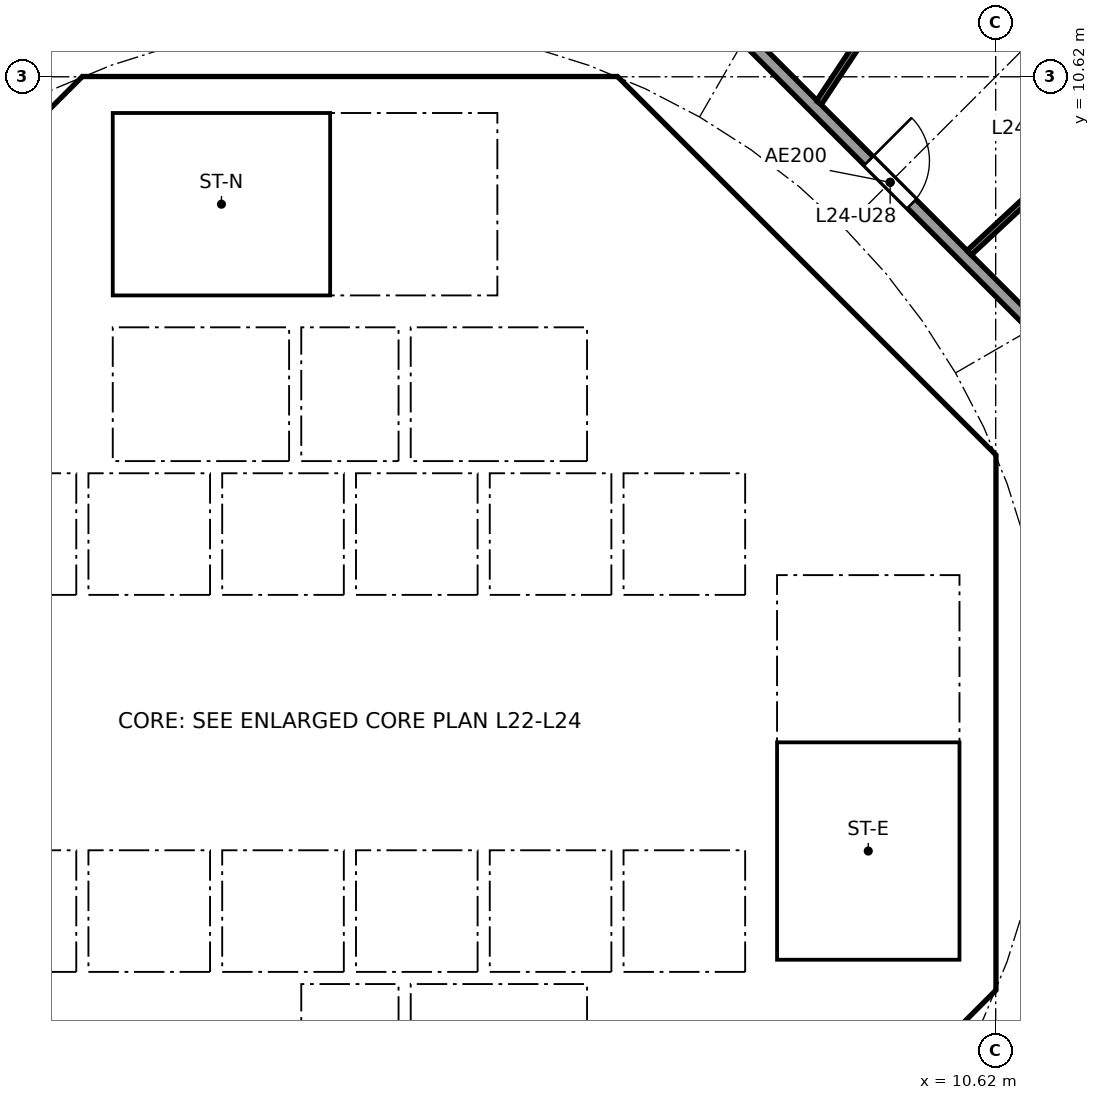
"""IFC4 building model, lengths in metres.
Left out: names, types, materials, properties, quantities, classifications, styles, units other than length and angle.
Written with IfcOpenShell. Run it as: python <this file> out.ifc"""

import sys

from ifc_helpers import new_model, si_unit, direction, frame, frame_2d, origin, place, context, subcontext, project, spatial, polyline, rectangle, outline, extrude, element, fill, save


model = new_model("IFC4")
c1 = context("Model", 3, precision=1e-05, world=origin(), true_north=direction((0.0, 1.0)))
c2 = subcontext(c1, "Body", "Model", "MODEL_VIEW")
j1 = project(units=[si_unit("LENGTHUNIT", "METRE"), si_unit("PLANEANGLEUNIT", "RADIAN")], contexts=[c1])
p1 = place(None, origin())
s1 = spatial("IfcSite", under=j1, at=p1, CompositionType="ELEMENT")
p2 = place(p1, origin())
s2 = spatial("IfcBuilding", under=s1, at=p2, CompositionType="ELEMENT")
p3 = place(p2, frame((0.0, 0.0, 99.2)))
s3 = spatial("IfcBuildingStorey", under=s2, at=p3, CompositionType="ELEMENT", Elevation=99.2)
p4 = place(p3, frame((9.988, 4.613, 0.0), z_axis=(0.0, 0.0, 1.0), x_axis=(-0.707106781187, 0.707106781187, 0.0)))
e1 = element("IfcWall", 1, at=p4, inside=s3, PredefinedType="SHEAR", context=c2, shape_type="SweptSolid", body=[
    extrude(rectangle(XDim=7.602, YDim=0.6, at=frame_2d((3.801, 0.0))), origin(), (0.0, 0.0, 1.0), 3.44),
])
p5 = place(p4, frame((3.201, 0.0, 0.0)))
e2 = element("IfcOpeningElement", 2, at=p5, cuts=e1, PredefinedType="OPENING", context=c2, shape_type="SweptSolid", body=[
    extrude(rectangle(XDim=1.2, YDim=2.1, at=frame_2d((0.6, 1.05))), frame((0.0, 0.31, 0.0), z_axis=(0.0, -1.0, 0.0), x_axis=(1.0, 0.0, 0.0)), (0.0, 0.0, 1.0), 0.62),
])
p6 = place(p3, frame((-4.613, 9.988, 0.0), z_axis=(0.0, 0.0, 1.0), x_axis=(-0.707106781187, -0.707106781187, 0.0)))
e3 = element("IfcWall", 3, at=p6, inside=s3, PredefinedType="SHEAR", context=c2, shape_type="SweptSolid", body=[
    extrude(rectangle(XDim=7.602, YDim=0.6, at=frame_2d((3.801, 0.0))), origin(), (0.0, 0.0, 1.0), 3.44),
])
p7 = place(p6, frame((0.351, 0.0, 0.0)))
e4 = element("IfcOpeningElement", 4, at=p7, cuts=e3, PredefinedType="OPENING", context=c2, shape_type="SweptSolid", body=[
    extrude(rectangle(XDim=1.1, YDim=2.1, at=frame_2d((0.55, 1.05))), frame((0.0, 0.31, 0.0), z_axis=(0.0, -1.0, 0.0), x_axis=(1.0, 0.0, 0.0)), (0.0, 0.0, 1.0), 0.62),
])
p8 = place(p3, frame((-9.988, -4.613, 0.0), z_axis=(0.0, 0.0, 1.0), x_axis=(0.707106781187, -0.707106781187, 0.0)))
e5 = element("IfcWall", 5, at=p8, inside=s3, PredefinedType="SHEAR", context=c2, shape_type="SweptSolid", body=[
    extrude(rectangle(XDim=7.602, YDim=0.6, at=frame_2d((3.801, 0.0))), origin(), (0.0, 0.0, 1.0), 3.44),
])
p9 = place(p8, frame((6.151, 0.0, 0.0)))
e6 = element("IfcOpeningElement", 6, at=p9, cuts=e5, PredefinedType="OPENING", context=c2, shape_type="SweptSolid", body=[
    extrude(rectangle(XDim=1.1, YDim=2.1, at=frame_2d((0.55, 1.05))), frame((0.0, 0.31, 0.0), z_axis=(0.0, -1.0, 0.0), x_axis=(1.0, 0.0, 0.0)), (0.0, 0.0, 1.0), 0.62),
])
p10 = place(p3, frame((4.613, -9.988, 0.0), z_axis=(0.0, 0.0, 1.0), x_axis=(0.707106781187, 0.707106781187, 0.0)))
e7 = element("IfcWall", 7, at=p10, inside=s3, PredefinedType="SHEAR", context=c2, shape_type="SweptSolid", body=[
    extrude(rectangle(XDim=7.602, YDim=0.6, at=frame_2d((3.801, 0.0))), origin(), (0.0, 0.0, 1.0), 3.44),
])
p11 = place(p10, frame((3.201, 0.0, 0.0)))
e8 = element("IfcOpeningElement", 8, at=p11, cuts=e7, PredefinedType="OPENING", context=c2, shape_type="SweptSolid", body=[
    extrude(rectangle(XDim=1.2, YDim=2.1, at=frame_2d((0.6, 1.05))), frame((0.0, 0.31, 0.0), z_axis=(0.0, -1.0, 0.0), x_axis=(1.0, 0.0, 0.0)), (0.0, 0.0, 1.0), 0.62),
])
p12 = place(p3, frame((4.0, 4.3, 0.0), z_axis=(0.0, 0.0, 1.0), x_axis=(0.0, 1.0, 0.0)))
e9 = element("IfcWall", 9, at=p12, inside=s3, PredefinedType="SOLIDWALL", context=c2, shape_type="SweptSolid", body=[
    extrude(rectangle(XDim=2.2, YDim=0.2, at=frame_2d((1.1, 0.0))), origin(), (0.0, 0.0, 1.0), 3.44),
])
p13 = place(p12, frame((0.55, 0.0, 0.0)))
e10 = element("IfcOpeningElement", 10, at=p13, cuts=e9, PredefinedType="OPENING", context=c2, shape_type="SweptSolid", body=[
    extrude(rectangle(XDim=1.1, YDim=2.1, at=frame_2d((0.55, 1.05))), frame((0.0, 0.11, 0.0), z_axis=(0.0, -1.0, 0.0), x_axis=(1.0, 0.0, 0.0)), (0.0, 0.0, 1.0), 0.22),
])
p14 = place(p3, frame((-4.0, 4.3, 0.0), z_axis=(0.0, 0.0, 1.0), x_axis=(0.0, 1.0, 0.0)))
e11 = element("IfcWall", 11, at=p14, inside=s3, PredefinedType="SOLIDWALL", context=c2, shape_type="SweptSolid", body=[
    extrude(rectangle(XDim=2.2, YDim=0.2, at=frame_2d((1.1, 0.0))), origin(), (0.0, 0.0, 1.0), 3.44),
])
p15 = place(p14, frame((0.55, 0.0, 0.0)))
e12 = element("IfcOpeningElement", 12, at=p15, cuts=e11, PredefinedType="OPENING", context=c2, shape_type="SweptSolid", body=[
    extrude(rectangle(XDim=1.1, YDim=2.1, at=frame_2d((0.55, 1.05))), frame((0.0, 0.11, 0.0), z_axis=(0.0, -1.0, 0.0), x_axis=(1.0, 0.0, 0.0)), (0.0, 0.0, 1.0), 0.22),
])
p16 = place(p3, frame((-6.7, 2.0, 0.0), z_axis=(0.0, 0.0, 1.0), x_axis=(1.0, 0.0, 0.0)))
e13 = element("IfcWall", 13, at=p16, inside=s3, PredefinedType="SOLIDWALL", context=c2, shape_type="SweptSolid", body=[
    extrude(rectangle(XDim=13.4, YDim=0.2, at=frame_2d((6.7, 0.0))), origin(), (0.0, 0.0, 1.0), 3.44),
])
p17 = place(p16, frame((0.65, 0.0, 0.0)))
e14 = element("IfcOpeningElement", 14, at=p17, cuts=e13, PredefinedType="OPENING", context=c2, shape_type="SweptSolid", body=[
    extrude(rectangle(XDim=1.1, YDim=2.1, at=frame_2d((0.55, 1.05))), frame((0.0, 0.11, 0.0), z_axis=(0.0, -1.0, 0.0), x_axis=(1.0, 0.0, 0.0)), (0.0, 0.0, 1.0), 0.22),
])
p18 = place(p16, frame((2.85, 0.0, 0.0)))
e15 = element("IfcOpeningElement", 15, at=p18, cuts=e13, PredefinedType="OPENING", context=c2, shape_type="SweptSolid", body=[
    extrude(rectangle(XDim=1.1, YDim=2.1, at=frame_2d((0.55, 1.05))), frame((0.0, 0.11, 0.0), z_axis=(0.0, -1.0, 0.0), x_axis=(1.0, 0.0, 0.0)), (0.0, 0.0, 1.0), 0.22),
])
p19 = place(p16, frame((5.05, 0.0, 0.0)))
e16 = element("IfcOpeningElement", 16, at=p19, cuts=e13, PredefinedType="OPENING", context=c2, shape_type="SweptSolid", body=[
    extrude(rectangle(XDim=1.1, YDim=2.1, at=frame_2d((0.55, 1.05))), frame((0.0, 0.11, 0.0), z_axis=(0.0, -1.0, 0.0), x_axis=(1.0, 0.0, 0.0)), (0.0, 0.0, 1.0), 0.22),
])
p20 = place(p3, frame((6.7, 4.0, 0.0), z_axis=(0.0, 0.0, 1.0), x_axis=(1.0, 0.0, 0.0)))
e17 = element("IfcWall", 17, at=p20, inside=s3, PredefinedType="SOLIDWALL", context=c2, shape_type="SweptSolid", body=[
    extrude(rectangle(XDim=3.325, YDim=0.2, at=frame_2d((1.662, 0.0))), origin(), (0.0, 0.0, 1.0), 3.44),
])
p21 = place(p20, frame((1.25, 0.0, 0.0)))
e18 = element("IfcOpeningElement", 18, at=p21, cuts=e17, PredefinedType="OPENING", context=c2, shape_type="SweptSolid", body=[
    extrude(rectangle(XDim=1.1, YDim=2.1, at=frame_2d((0.55, 1.05))), frame((0.0, 0.11, 0.0), z_axis=(0.0, -1.0, 0.0), x_axis=(1.0, 0.0, 0.0)), (0.0, 0.0, 1.0), 0.22),
])
p22 = place(p3, frame((4.0, 7.025, 0.0), z_axis=(0.0, 0.0, 1.0), x_axis=(0.0, 1.0, 0.0)))
e19 = element("IfcWall", 19, at=p22, inside=s3, PredefinedType="SOLIDWALL", context=c2, shape_type="SweptSolid", body=[
    extrude(rectangle(XDim=3.0, YDim=0.2, at=frame_2d((1.5, 0.0))), origin(), (0.0, 0.0, 1.0), 3.44),
])
p23 = place(p22, frame((0.925, 0.0, 0.0)))
e20 = element("IfcOpeningElement", 20, at=p23, cuts=e19, PredefinedType="OPENING", context=c2, shape_type="SweptSolid", body=[
    extrude(rectangle(XDim=1.1, YDim=2.1, at=frame_2d((0.55, 1.05))), frame((0.0, 0.11, 0.0), z_axis=(0.0, -1.0, 0.0), x_axis=(1.0, 0.0, 0.0)), (0.0, 0.0, 1.0), 0.22),
])
p24 = place(p3, frame((4.0, -6.5, 0.0), z_axis=(0.0, 0.0, 1.0), x_axis=(0.0, 1.0, 0.0)))
e21 = element("IfcWall", 21, at=p24, inside=s3, PredefinedType="SOLIDWALL", context=c2, shape_type="SweptSolid", body=[
    extrude(rectangle(XDim=2.2, YDim=0.2, at=frame_2d((1.1, 0.0))), origin(), (0.0, 0.0, 1.0), 3.44),
])
p25 = place(p24, frame((0.55, 0.0, 0.0)))
e22 = element("IfcOpeningElement", 22, at=p25, cuts=e21, PredefinedType="OPENING", context=c2, shape_type="SweptSolid", body=[
    extrude(rectangle(XDim=1.1, YDim=2.1, at=frame_2d((0.55, 1.05))), frame((0.0, 0.11, 0.0), z_axis=(0.0, -1.0, 0.0), x_axis=(1.0, 0.0, 0.0)), (0.0, 0.0, 1.0), 0.22),
])
p26 = place(p3, frame((-4.0, -6.5, 0.0), z_axis=(0.0, 0.0, 1.0), x_axis=(0.0, 1.0, 0.0)))
e23 = element("IfcWall", 23, at=p26, inside=s3, PredefinedType="SOLIDWALL", context=c2, shape_type="SweptSolid", body=[
    extrude(rectangle(XDim=2.2, YDim=0.2, at=frame_2d((1.1, 0.0))), origin(), (0.0, 0.0, 1.0), 3.44),
])
p27 = place(p26, frame((0.65, 0.0, 0.0)))
e24 = element("IfcOpeningElement", 24, at=p27, cuts=e23, PredefinedType="OPENING", context=c2, shape_type="SweptSolid", body=[
    extrude(rectangle(XDim=0.9, YDim=2.1, at=frame_2d((0.45, 1.05))), frame((0.0, 0.11, 0.0), z_axis=(0.0, -1.0, 0.0), x_axis=(1.0, 0.0, 0.0)), (0.0, 0.0, 1.0), 0.22),
])
p28 = place(p3, frame((-6.7, -2.0, 0.0), z_axis=(0.0, 0.0, 1.0), x_axis=(1.0, 0.0, 0.0)))
e25 = element("IfcWall", 25, at=p28, inside=s3, PredefinedType="SOLIDWALL", context=c2, shape_type="SweptSolid", body=[
    extrude(rectangle(XDim=13.4, YDim=0.2, at=frame_2d((6.7, 0.0))), origin(), (0.0, 0.0, 1.0), 3.44),
])
p29 = place(p28, frame((0.65, 0.0, 0.0)))
e26 = element("IfcOpeningElement", 26, at=p29, cuts=e25, PredefinedType="OPENING", context=c2, shape_type="SweptSolid", body=[
    extrude(rectangle(XDim=1.1, YDim=2.1, at=frame_2d((0.55, 1.05))), frame((0.0, 0.11, 0.0), z_axis=(0.0, -1.0, 0.0), x_axis=(1.0, 0.0, 0.0)), (0.0, 0.0, 1.0), 0.22),
])
p30 = place(p28, frame((2.85, 0.0, 0.0)))
e27 = element("IfcOpeningElement", 27, at=p30, cuts=e25, PredefinedType="OPENING", context=c2, shape_type="SweptSolid", body=[
    extrude(rectangle(XDim=1.1, YDim=2.1, at=frame_2d((0.55, 1.05))), frame((0.0, 0.11, 0.0), z_axis=(0.0, -1.0, 0.0), x_axis=(1.0, 0.0, 0.0)), (0.0, 0.0, 1.0), 0.22),
])
p31 = place(p3, origin())
e28 = element("IfcWall", 28, at=p31, inside=s3, PredefinedType="SHEAR", context=c2, shape_type="SweptSolid", body=[
    extrude(outline(polyline([(-4.152, 10.025), (-4.401, 9.776), (-4.825, 10.2), (-4.401, 10.625), (4.401, 10.625), (4.825, 10.2), (4.401, 9.776), (4.152, 10.025), (-4.152, 10.025)])), origin(), (0.0, 0.0, 1.0), 3.44),
])
p32 = place(p3, origin())
e29 = element("IfcWall", 29, at=p32, inside=s3, PredefinedType="SHEAR", context=c2, shape_type="SweptSolid", body=[
    extrude(outline(polyline([(9.776, -4.401), (10.025, -4.152), (10.025, -3.801), (10.025, 4.152), (9.776, 4.401), (10.2, 4.825), (10.625, 4.401), (10.625, -4.401), (10.2, -4.825), (9.776, -4.401)])), origin(), (0.0, 0.0, 1.0), 3.44),
])
for number, where, z_axis, x_axis in (
    (30, (-0.9, -6.5, 0.0), (0.0, 0.0, 1.0), (0.0, 1.0, 0.0)),
    (31, (0.9, -6.5, 0.0), (0.0, 0.0, 1.0), (0.0, 1.0, 0.0)),
):
    element("IfcWall", number, at=place(p3, frame(where, z_axis=z_axis, x_axis=x_axis)), inside=s3, PredefinedType="SOLIDWALL", context=c2, shape_type="SweptSolid", body=[
        extrude(rectangle(XDim=2.2, YDim=0.2, at=frame_2d((1.1, 0.0))), origin(), (0.0, 0.0, 1.0), 3.44),
    ])
p33 = place(p3, origin())
e32 = element("IfcWall", 32, at=p33, inside=s3, PredefinedType="SOLIDWALL", context=c2, shape_type="SweptSolid", body=[
    extrude(outline(polyline([(-6.7, -2.1), (-6.5, -2.1), (-6.5, -4.1), (-4.5, -4.1), (-4.5, -2.1), (-4.3, -2.1), (-4.3, -4.1), (-2.3, -4.1), (-2.3, -2.1), (-2.1, -2.1), (-2.1, -4.1), (-0.1, -4.1), (-0.1, -2.1), (0.1, -2.1), (0.1, -4.1), (2.1, -4.1), (2.1, -2.1), (2.3, -2.1), (2.3, -4.1), (4.3, -4.1), (4.3, -2.1), (4.5, -2.1), (4.5, -4.1), (6.5, -4.1), (6.5, -2.1), (6.7, -2.1), (6.7, -4.3), (-6.7, -4.3), (-6.7, -2.1)])), origin(), (0.0, 0.0, 1.0), 3.44),
])
for number, where, z_axis, x_axis in (
    (33, (-0.9, 4.3, 0.0), (0.0, 0.0, 1.0), (0.0, 1.0, 0.0)),
    (34, (0.9, 4.3, 0.0), (0.0, 0.0, 1.0), (0.0, 1.0, 0.0)),
):
    element("IfcWall", number, at=place(p3, frame(where, z_axis=z_axis, x_axis=x_axis)), inside=s3, PredefinedType="SOLIDWALL", context=c2, shape_type="SweptSolid", body=[
        extrude(rectangle(XDim=2.2, YDim=0.2, at=frame_2d((1.1, 0.0))), origin(), (0.0, 0.0, 1.0), 3.44),
    ])
p34 = place(p3, origin())
e35 = element("IfcWall", 35, at=p34, inside=s3, PredefinedType="SOLIDWALL", context=c2, shape_type="SweptSolid", body=[
    extrude(outline(polyline([(-6.5, 2.1), (-6.7, 2.1), (-6.7, 4.3), (6.7, 4.3), (6.7, 2.1), (6.5, 2.1), (6.5, 4.1), (4.5, 4.1), (4.5, 2.1), (4.3, 2.1), (4.3, 4.1), (2.3, 4.1), (2.3, 2.1), (2.1, 2.1), (2.1, 4.1), (0.1, 4.1), (0.1, 2.1), (-0.1, 2.1), (-0.1, 4.1), (-2.1, 4.1), (-2.1, 2.1), (-2.3, 2.1), (-2.3, 4.1), (-4.3, 4.1), (-4.3, 2.1), (-4.5, 2.1), (-4.5, 4.1), (-6.5, 4.1), (-6.5, 2.1)])), origin(), (0.0, 0.0, 1.0), 3.44),
])
p35 = place(p3, origin())
e36 = element("IfcWall", 36, at=p35, inside=s3, PredefinedType="SOLIDWALL", context=c2, shape_type="SweptSolid", body=[
    extrude(outline(polyline([(-3.9, 7.025), (-4.1, 7.025), (-4.1, 10.025), (-3.9, 10.025), (-3.9, 7.025)])), origin(), (0.0, 0.0, 1.0), 3.44),
])
p36 = place(p3, origin())
e37 = element("IfcWall", 37, at=p36, inside=s3, PredefinedType="SOLIDWALL", context=c2, shape_type="SweptSolid", body=[
    extrude(outline(polyline([(4.1, 6.5), (-4.1, 6.5), (-4.1, 7.025), (4.1, 7.025), (4.1, 6.5)])), origin(), (0.0, 0.0, 1.0), 3.44),
])
p37 = place(p3, origin())
e38 = element("IfcWall", 38, at=p37, inside=s3, PredefinedType="SOLIDWALL", context=c2, shape_type="SweptSolid", body=[
    extrude(outline(polyline([(7.025, -3.9), (6.7, -3.9), (6.7, 3.9), (7.025, 3.9), (7.025, -3.9)])), origin(), (0.0, 0.0, 1.0), 3.44),
])
p38 = place(p3, origin())
e39 = element("IfcWall", 39, at=p38, inside=s3, PredefinedType="SOLIDWALL", context=c2, shape_type="SweptSolid", body=[
    extrude(outline(polyline([(10.025, -4.1), (6.7, -4.1), (6.7, -3.9), (10.025, -3.9), (10.025, -4.1)])), origin(), (0.0, 0.0, 1.0), 3.44),
])
p39 = place(p3, frame((12.635, 5.134, 0.0), z_axis=(0.0, 0.0, 1.0), x_axis=(-0.707106781187, 0.707106781187, 0.0)))
e40 = element("IfcWall", 40, at=p39, inside=s3, PredefinedType="PARTITIONING", context=c2, shape_type="SweptSolid", body=[
    extrude(rectangle(XDim=10.609, YDim=0.2, at=frame_2d((5.305, 0.0))), origin(), (0.0, 0.0, 1.0), 3.44),
])
p40 = place(p39, frame((4.804, 0.0, 0.0)))
e41 = element("IfcOpeningElement", 41, at=p40, cuts=e40, PredefinedType="OPENING", context=c2, shape_type="SweptSolid", body=[
    extrude(rectangle(XDim=1.0, YDim=2.1, at=frame_2d((0.5, 1.05))), frame((0.0, 0.11, 0.0), z_axis=(0.0, -1.0, 0.0), x_axis=(1.0, 0.0, 0.0)), (0.0, 0.0, 1.0), 0.22),
])
p41 = place(p3, frame((10.185, 7.726, 0.0), z_axis=(0.0, 0.0, 1.0), x_axis=(0.732598472978, 0.680661059112, 0.0)))
e42 = element("IfcWall", 42, at=p41, inside=s3, PredefinedType="PARTITIONING", context=c2, shape_type="SweptSolid", body=[
    extrude(rectangle(XDim=10.167, YDim=0.1, at=frame_2d((5.084, 0.0))), origin(), (0.0, 0.0, 1.0), 2.687),
])
p42 = place(p41, frame((1.725, 0.0, 0.0)))
e43 = element("IfcOpeningElement", 43, at=p42, cuts=e42, PredefinedType="OPENING", context=c2, shape_type="SweptSolid", body=[
    extrude(rectangle(XDim=0.9, YDim=2.1, at=frame_2d((0.45, 1.05))), frame((0.0, 0.06, 0.0), z_axis=(0.0, -1.0, 0.0), x_axis=(1.0, 0.0, 0.0)), (0.0, 0.0, 1.0), 0.12),
])
p43 = place(p41, frame((6.784, 0.0, 0.0)))
e44 = element("IfcOpeningElement", 44, at=p43, cuts=e42, PredefinedType="OPENING", context=c2, shape_type="SweptSolid", body=[
    extrude(rectangle(XDim=0.9, YDim=2.1, at=frame_2d((0.45, 1.05))), frame((0.0, 0.06, 0.0), z_axis=(0.0, -1.0, 0.0), x_axis=(1.0, 0.0, 0.0)), (0.0, 0.0, 1.0), 0.12),
])
p44 = place(p3, frame((7.713, 10.195, 0.0), z_axis=(0.0, 0.0, 1.0), x_axis=(0.552111071171, 0.833770571015, 0.0)))
e45 = element("IfcWall", 45, at=p44, inside=s3, PredefinedType="PARTITIONING", context=c2, shape_type="SweptSolid", body=[
    extrude(rectangle(XDim=17.208, YDim=0.1, at=frame_2d((8.604, 0.0))), origin(), (0.0, 0.0, 1.0), 2.687),
])
p45 = place(p44, frame((1.976, 0.0, 0.0)))
e46 = element("IfcOpeningElement", 46, at=p45, cuts=e45, PredefinedType="OPENING", context=c2, shape_type="SweptSolid", body=[
    extrude(rectangle(XDim=0.9, YDim=2.1, at=frame_2d((0.45, 1.05))), frame((0.0, 0.06, 0.0), z_axis=(0.0, -1.0, 0.0), x_axis=(1.0, 0.0, 0.0)), (0.0, 0.0, 1.0), 0.12),
])
p46 = place(p44, frame((7.611, 0.0, 0.0)))
e47 = element("IfcOpeningElement", 47, at=p46, cuts=e45, PredefinedType="OPENING", context=c2, shape_type="SweptSolid", body=[
    extrude(rectangle(XDim=0.9, YDim=2.1, at=frame_2d((0.45, 1.05))), frame((0.0, 0.06, 0.0), z_axis=(0.0, -1.0, 0.0), x_axis=(1.0, 0.0, 0.0)), (0.0, 0.0, 1.0), 0.12),
])
p47 = place(p44, frame((13.79, 0.0, 0.0)))
e48 = element("IfcOpeningElement", 48, at=p47, cuts=e45, PredefinedType="OPENING", context=c2, shape_type="SweptSolid", body=[
    extrude(rectangle(XDim=0.9, YDim=2.1, at=frame_2d((0.45, 1.05))), frame((0.0, 0.06, 0.0), z_axis=(0.0, -1.0, 0.0), x_axis=(1.0, 0.0, 0.0)), (0.0, 0.0, 1.0), 0.12),
])
p48 = place(p18, origin())
e49 = element("IfcDoor", 49, at=p48, inside=s3, OperationType="DOUBLE_DOOR_SLIDING", PredefinedType="DOOR", context=c2, shape_type="SweptSolid", body=[
    extrude(rectangle(XDim=1.1, YDim=2.1, at=frame_2d((0.55, 1.05))), frame((0.0, 0.025, 0.0), z_axis=(0.0, -1.0, 0.0), x_axis=(1.0, 0.0, 0.0)), (0.0, 0.0, 1.0), 0.05),
])
fill(e15, e49)
p49 = place(p19, origin())
e50 = element("IfcDoor", 50, at=p49, inside=s3, OperationType="DOUBLE_DOOR_SLIDING", PredefinedType="DOOR", context=c2, shape_type="SweptSolid", body=[
    extrude(rectangle(XDim=1.1, YDim=2.1, at=frame_2d((0.55, 1.05))), frame((0.0, 0.025, 0.0), z_axis=(0.0, -1.0, 0.0), x_axis=(1.0, 0.0, 0.0)), (0.0, 0.0, 1.0), 0.05),
])
fill(e16, e50)
p50 = place(p30, origin())
e51 = element("IfcDoor", 51, at=p50, inside=s3, OperationType="DOUBLE_DOOR_SLIDING", PredefinedType="DOOR", context=c2, shape_type="SweptSolid", body=[
    extrude(rectangle(XDim=1.1, YDim=2.1, at=frame_2d((0.55, 1.05))), frame((0.0, 0.025, 0.0), z_axis=(0.0, -1.0, 0.0), x_axis=(1.0, 0.0, 0.0)), (0.0, 0.0, 1.0), 0.05),
])
fill(e27, e51)
p51 = place(p13, origin())
e52 = element("IfcDoor", 52, at=p51, inside=s3, OperationType="DOUBLE_DOOR_SLIDING", PredefinedType="DOOR", context=c2, shape_type="SweptSolid", body=[
    extrude(rectangle(XDim=1.1, YDim=2.1, at=frame_2d((0.55, 1.05))), frame((0.0, 0.025, 0.0), z_axis=(0.0, -1.0, 0.0), x_axis=(1.0, 0.0, 0.0)), (0.0, 0.0, 1.0), 0.05),
])
fill(e10, e52)
p52 = place(p25, origin())
e53 = element("IfcDoor", 53, at=p52, inside=s3, OperationType="DOUBLE_DOOR_SLIDING", PredefinedType="DOOR", context=c2, shape_type="SweptSolid", body=[
    extrude(rectangle(XDim=1.1, YDim=2.1, at=frame_2d((0.55, 1.05))), frame((0.0, 0.025, 0.0), z_axis=(0.0, -1.0, 0.0), x_axis=(1.0, 0.0, 0.0)), (0.0, 0.0, 1.0), 0.05),
])
fill(e22, e53)
p53 = place(p15, origin())
e54 = element("IfcDoor", 54, at=p53, inside=s3, OperationType="DOUBLE_DOOR_SLIDING", PredefinedType="DOOR", context=c2, shape_type="SweptSolid", body=[
    extrude(rectangle(XDim=1.1, YDim=2.1, at=frame_2d((0.55, 1.05))), frame((0.0, 0.025, 0.0), z_axis=(0.0, -1.0, 0.0), x_axis=(1.0, 0.0, 0.0)), (0.0, 0.0, 1.0), 0.05),
])
fill(e12, e54)
p54 = place(p21, frame((1.1, 0.0, 0.0), x_axis=(-1.0, 0.0, 0.0)))
e55 = element("IfcDoor", 55, at=p54, inside=s3, OperationType="SINGLE_SWING_LEFT", PredefinedType="DOOR", context=c2, shape_type="SweptSolid", body=[
    extrude(rectangle(XDim=1.1, YDim=2.1, at=frame_2d((0.55, 1.05))), frame((0.0, 0.025, 0.0), z_axis=(0.0, -1.0, 0.0), x_axis=(1.0, 0.0, 0.0)), (0.0, 0.0, 1.0), 0.05),
])
fill(e18, e55)
p55 = place(p23, origin())
e56 = element("IfcDoor", 56, at=p55, inside=s3, OperationType="SINGLE_SWING_RIGHT", PredefinedType="DOOR", context=c2, shape_type="SweptSolid", body=[
    extrude(rectangle(XDim=1.1, YDim=2.1, at=frame_2d((0.55, 1.05))), frame((0.0, 0.025, 0.0), z_axis=(0.0, -1.0, 0.0), x_axis=(1.0, 0.0, 0.0)), (0.0, 0.0, 1.0), 0.05),
])
fill(e20, e56)
p56 = place(p5, origin())
e57 = element("IfcDoor", 57, at=p56, inside=s3, OperationType="SINGLE_SWING_LEFT", PredefinedType="DOOR", context=c2, shape_type="SweptSolid", body=[
    extrude(rectangle(XDim=1.2, YDim=2.1, at=frame_2d((0.6, 1.05))), frame((0.0, 0.025, 0.0), z_axis=(0.0, -1.0, 0.0), x_axis=(1.0, 0.0, 0.0)), (0.0, 0.0, 1.0), 0.05),
])
fill(e2, e57)
p57 = place(p7, origin())
e58 = element("IfcDoor", 58, at=p57, inside=s3, OperationType="SINGLE_SWING_LEFT", PredefinedType="DOOR", context=c2, shape_type="SweptSolid", body=[
    extrude(rectangle(XDim=1.1, YDim=2.1, at=frame_2d((0.55, 1.05))), frame((0.0, 0.025, 0.0), z_axis=(0.0, -1.0, 0.0), x_axis=(1.0, 0.0, 0.0)), (0.0, 0.0, 1.0), 0.05),
])
fill(e4, e58)
p58 = place(p40, frame((1.0, 0.0, 0.0), x_axis=(-1.0, 0.0, 0.0)))
e59 = element("IfcDoor", 59, at=p58, inside=s3, OperationType="SINGLE_SWING_LEFT", PredefinedType="DOOR", context=c2, shape_type="SweptSolid", body=[
    extrude(rectangle(XDim=1.0, YDim=2.1, at=frame_2d((0.5, 1.05))), frame((0.0, 0.025, 0.0), z_axis=(0.0, -1.0, 0.0), x_axis=(1.0, 0.0, 0.0)), (0.0, 0.0, 1.0), 0.05),
])
fill(e41, e59)
save(model, sys.argv[1])
